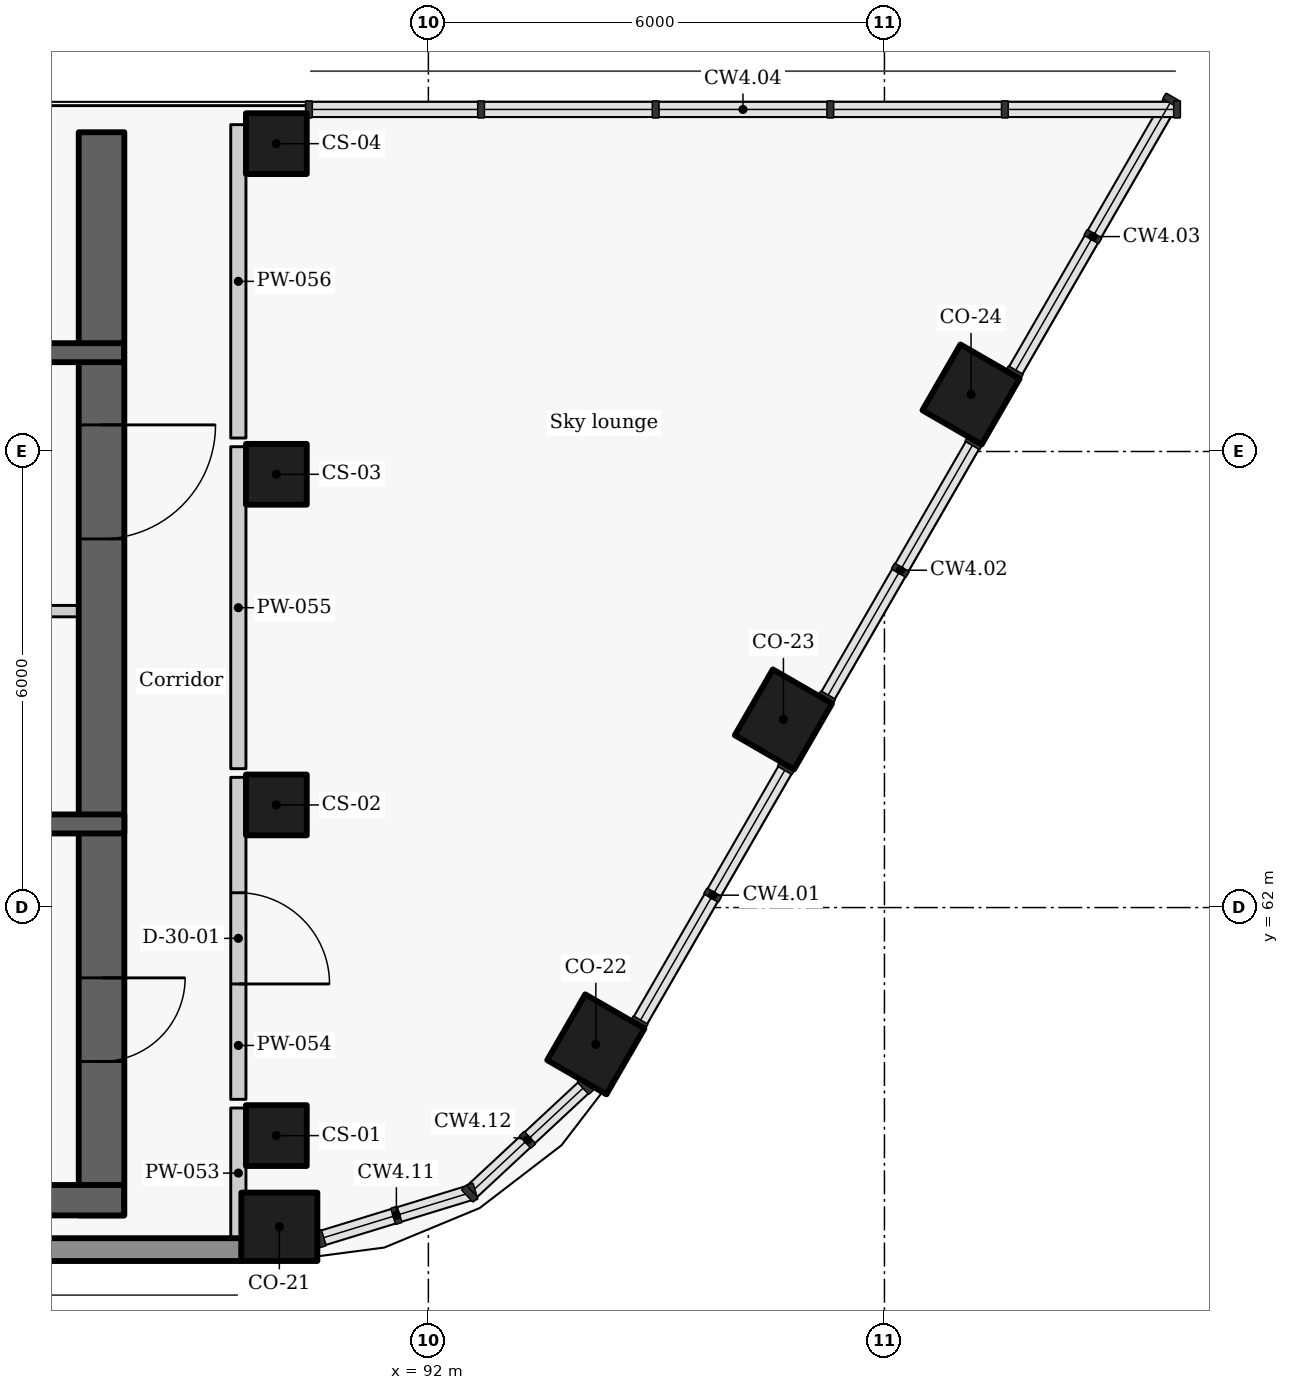
"""IFC4 building model, lengths in metres.
Left out: names, types, materials, properties, quantities, classifications, styles, units other than length and angle.
Written with IfcOpenShell. Run it as: python <this file> out.ifc"""

import sys

from ifc_helpers import new_model, si_unit, direction, frame, frame_2d, origin, origin_2d, place, context, subcontext, project, spatial, rectangle, extrude, element, fill, save


model = new_model("IFC4")
c1 = context("Model", 3, precision=1e-05, world=origin(), true_north=direction((0.0, 1.0)))
c2 = subcontext(c1, "Body", "Model", "MODEL_VIEW")
j1 = project(units=[si_unit("LENGTHUNIT", "METRE"), si_unit("PLANEANGLEUNIT", "RADIAN")], contexts=[c1])
p1 = place(None, origin())
s1 = spatial("IfcSite", under=j1, at=p1, CompositionType="ELEMENT")
p2 = place(p1, origin())
s2 = spatial("IfcBuilding", under=s1, at=p2, CompositionType="ELEMENT")
p3 = place(p2, frame((0.0, 0.0, 283.2)))
s3 = spatial("IfcBuildingStorey", under=s2, at=p3, CompositionType="ELEMENT", Elevation=283.2)
for number, where, z_axis, x_axis in (
    (1, (90.04, 57.8, 0.0), (0.0, 0.0, 1.0), (1.0, 0.0, 0.0)),
    (2, (94.203, 60.2, 0.0), (0.0, 0.0, 1.0), (0.5, 0.866, 0.0)),
    (3, (96.671, 64.475, 0.0), (0.0, 0.0, 1.0), (0.5, 0.866, 0.0)),
    (4, (99.139, 68.75, 0.0), (0.0, 0.0, 1.0), (0.5, 0.866, 0.0)),
):
    element("IfcColumn", number, at=place(p3, frame(where, z_axis=z_axis, x_axis=x_axis)), inside=s3, PredefinedType="COLUMN", context=c2, shape_type="SweptSolid", body=[
        extrude(rectangle(XDim=1.0, YDim=0.9, at=origin_2d()), origin(), (0.0, 0.0, 1.0), 3.6),
    ])
for number, where, z_axis, x_axis in (
    (5, (90.0, 59.0, 0.0), (0.0, 0.0, 1.0), (0.0, 1.0, 0.0)),
    (6, (90.0, 63.35, 0.0), (0.0, 0.0, 1.0), (0.0, 1.0, 0.0)),
    (7, (90.0, 67.7, 0.0), (0.0, 0.0, 1.0), (0.0, 1.0, 0.0)),
    (8, (90.0, 72.05, 0.0), (0.0, 0.0, 1.0), (0.0, 1.0, 0.0)),
):
    element("IfcColumn", number, at=place(p3, frame(where, z_axis=z_axis, x_axis=x_axis)), inside=s3, PredefinedType="COLUMN", context=c2, shape_type="SweptSolid", body=[
        extrude(rectangle(XDim=0.8, YDim=0.8, at=origin_2d()), origin(), (0.0, 0.0, 1.0), 3.6),
    ])
p4 = place(p3, frame((70.451, 57.5, 0.0), z_axis=(0.0, 0.0, 1.0), x_axis=(1.0, 0.0, 0.0)))
e9 = element("IfcWall", 9, at=p4, inside=s3, PredefinedType="SOLIDWALL", context=c2, shape_type="SweptSolid", body=[
    extrude(rectangle(XDim=19.093, YDim=0.3, at=frame_2d((9.546, 0.0))), origin(), (0.0, 0.0, 1.0), 2.725),
])
p5 = place(p3, frame((88.0, 65.9, 0.0), z_axis=(0.0, 0.0, 1.0), x_axis=(-1.0, 0.0, 0.0)))
e10 = element("IfcWall", 10, at=p5, inside=s3, PredefinedType="PARTITIONING", context=c2, shape_type="SweptSolid", body=[
    extrude(rectangle(XDim=2.603, YDim=0.15, at=frame_2d((1.302, 0.0))), origin(), (0.0, 0.0, 1.0), 3.325),
])
p6 = place(p5, frame((1.175, 0.0, 0.0)))
e11 = element("IfcOpeningElement", 11, at=p6, cuts=e10, PredefinedType="OPENING", context=c2, shape_type="SweptSolid", body=[
    extrude(rectangle(XDim=0.9, YDim=2.1, at=frame_2d((0.45, 1.05))), frame((0.0, 0.085, 0.0), z_axis=(0.0, -1.0, 0.0), x_axis=(1.0, 0.0, 0.0)), (0.0, 0.0, 1.0), 0.17),
])
p7 = place(p3, frame((87.7, 69.3, -0.275), z_axis=(0.0, 0.0, 1.0), x_axis=(0.0, -1.0, 0.0)))
e12 = element("IfcWall", 12, at=p7, inside=s3, PredefinedType="SHEAR", context=c2, shape_type="SweptSolid", body=[
    extrude(rectangle(XDim=11.35, YDim=0.6, at=frame_2d((5.675, 0.0))), origin(), (0.0, 0.0, 1.0), 3.6),
])
p8 = place(p7, frame((0.95, 0.0, 0.275)))
e13 = element("IfcOpeningElement", 13, at=p8, cuts=e12, PredefinedType="OPENING", context=c2, shape_type="SweptSolid", body=[
    extrude(rectangle(XDim=1.5, YDim=2.1, at=frame_2d((0.75, 1.05))), frame((0.0, 0.31, 0.0), z_axis=(0.0, -1.0, 0.0), x_axis=(1.0, 0.0, 0.0)), (0.0, 0.0, 1.0), 0.62),
])
p9 = place(p7, frame((8.225, 0.0, 0.275)))
e14 = element("IfcOpeningElement", 14, at=p9, cuts=e12, PredefinedType="OPENING", context=c2, shape_type="SweptSolid", body=[
    extrude(rectangle(XDim=1.1, YDim=2.1, at=frame_2d((0.55, 1.05))), frame((0.0, 0.31, 0.0), z_axis=(0.0, -1.0, 0.0), x_axis=(1.0, 0.0, 0.0)), (0.0, 0.0, 1.0), 0.62),
])
p10 = place(p3, frame((80.547, 63.1, -0.275), z_axis=(0.0, 0.0, 1.0), x_axis=(1.0, 0.0, 0.0)))
e15 = element("IfcWall", 15, at=p10, inside=s3, PredefinedType="SHEAR", context=c2, shape_type="SweptSolid", body=[
    extrude(rectangle(XDim=7.453, YDim=0.25, at=frame_2d((3.727, 0.0))), origin(), (0.0, 0.0, 1.0), 3.6),
])
p11 = place(p10, frame((3.302, 0.0, 0.275)))
e16 = element("IfcOpeningElement", 16, at=p11, cuts=e15, PredefinedType="OPENING", context=c2, shape_type="SweptSolid", body=[
    extrude(rectangle(XDim=1.1, YDim=2.1, at=frame_2d((0.55, 1.05))), frame((0.0, 0.135, 0.0), z_axis=(0.0, -1.0, 0.0), x_axis=(1.0, 0.0, 0.0)), (0.0, 0.0, 1.0), 0.27),
])
p12 = place(p3, frame((89.5, 57.65, 0.0), z_axis=(0.0, 0.0, 1.0), x_axis=(0.0, 1.0, 0.0)))
e17 = element("IfcWall", 17, at=p12, inside=s3, PredefinedType="PARTITIONING", context=c2, shape_type="SweptSolid", body=[
    extrude(rectangle(XDim=1.713, YDim=0.2, at=frame_2d((0.856, 0.0))), origin(), (0.0, 0.0, 1.0), 3.325),
])
p13 = place(p3, frame((89.5, 63.713, 0.0), z_axis=(0.0, 0.0, 1.0), x_axis=(0.0, -1.0, 0.0)))
e18 = element("IfcWall", 18, at=p13, inside=s3, PredefinedType="PARTITIONING", context=c2, shape_type="SweptSolid", body=[
    extrude(rectangle(XDim=4.236, YDim=0.2, at=frame_2d((2.118, 0.0))), origin(), (0.0, 0.0, 1.0), 3.325),
])
p14 = place(p13, frame((1.518, 0.0, 0.0)))
e19 = element("IfcOpeningElement", 19, at=p14, cuts=e18, PredefinedType="OPENING", context=c2, shape_type="SweptSolid", body=[
    extrude(rectangle(XDim=1.2, YDim=2.1, at=frame_2d((0.6, 1.05))), frame((0.0, 0.11, 0.0), z_axis=(0.0, -1.0, 0.0), x_axis=(1.0, 0.0, 0.0)), (0.0, 0.0, 1.0), 0.22),
])
p15 = place(p3, frame((89.5, 63.827, 0.0), z_axis=(0.0, 0.0, 1.0), x_axis=(0.0, 1.0, 0.0)))
e20 = element("IfcWall", 20, at=p15, inside=s3, PredefinedType="PARTITIONING", context=c2, shape_type="SweptSolid", body=[
    extrude(rectangle(XDim=4.236, YDim=0.2, at=frame_2d((2.118, 0.0))), origin(), (0.0, 0.0, 1.0), 3.325),
])
p16 = place(p3, frame((89.5, 68.177, 0.0), z_axis=(0.0, 0.0, 1.0), x_axis=(0.0, 1.0, 0.0)))
e21 = element("IfcWall", 21, at=p16, inside=s3, PredefinedType="PARTITIONING", context=c2, shape_type="SweptSolid", body=[
    extrude(rectangle(XDim=4.123, YDim=0.2, at=frame_2d((2.062, 0.0))), origin(), (0.0, 0.0, 1.0), 3.325),
])
p17 = place(p3, frame((87.7, 69.304, -0.275), z_axis=(0.0, 0.0, 1.0), x_axis=(0.0, 1.0, 0.0)))
e22 = element("IfcWall", 22, at=p17, inside=s3, PredefinedType="SHEAR", context=c2, shape_type="SweptSolid", body=[
    extrude(rectangle(XDim=2.896, YDim=0.6, at=frame_2d((1.448, 0.0))), origin(), (0.0, 0.0, 1.0), 3.6),
])
p18 = place(p3, frame((85.404, 69.3, -0.275), z_axis=(0.0, 0.0, 1.0), x_axis=(1.0, 0.0, 0.0)))
e23 = element("IfcWall", 23, at=p18, inside=s3, PredefinedType="SHEAR", context=c2, shape_type="SweptSolid", body=[
    extrude(rectangle(XDim=2.592, YDim=0.25, at=frame_2d((1.296, 0.0))), origin(), (0.0, 0.0, 1.0), 3.6),
])
p19 = place(p3, frame((72.004, 58.15, -0.275), z_axis=(0.0, 0.0, 1.0), x_axis=(1.0, 0.0, 0.0)))
e24 = element("IfcWall", 24, at=p19, inside=s3, PredefinedType="SHEAR", context=c2, shape_type="SweptSolid", body=[
    extrude(rectangle(XDim=15.992, YDim=0.4, at=frame_2d((7.996, 0.0))), origin(), (0.0, 0.0, 1.0), 3.6),
])
p20 = place(p14, origin())
e25 = element("IfcDoor", 25, at=p20, inside=s3, OperationType="SINGLE_SWING_RIGHT", PredefinedType="DOOR", context=c2, shape_type="SweptSolid", body=[
    extrude(rectangle(XDim=1.2, YDim=2.1, at=frame_2d((0.6, 1.05))), frame((0.0, 0.025, 0.0), z_axis=(0.0, -1.0, 0.0), x_axis=(1.0, 0.0, 0.0)), (0.0, 0.0, 1.0), 0.05),
])
fill(e19, e25)
p21 = place(p8, origin())
e26 = element("IfcDoor", 26, at=p21, inside=s3, OperationType="DOUBLE_DOOR_SINGLE_SWING", PredefinedType="DOOR", context=c2, shape_type="SweptSolid", body=[
    extrude(rectangle(XDim=1.5, YDim=2.1, at=frame_2d((0.75, 1.05))), frame((0.0, 0.025, 0.0), z_axis=(0.0, -1.0, 0.0), x_axis=(1.0, 0.0, 0.0)), (0.0, 0.0, 1.0), 0.05),
])
fill(e13, e26)
p22 = place(p9, origin())
e27 = element("IfcDoor", 27, at=p22, inside=s3, OperationType="SINGLE_SWING_LEFT", PredefinedType="DOOR", context=c2, shape_type="SweptSolid", body=[
    extrude(rectangle(XDim=1.1, YDim=2.1, at=frame_2d((0.55, 1.05))), frame((0.0, 0.025, 0.0), z_axis=(0.0, -1.0, 0.0), x_axis=(1.0, 0.0, 0.0)), (0.0, 0.0, 1.0), 0.05),
])
fill(e14, e27)
save(model, sys.argv[1])
